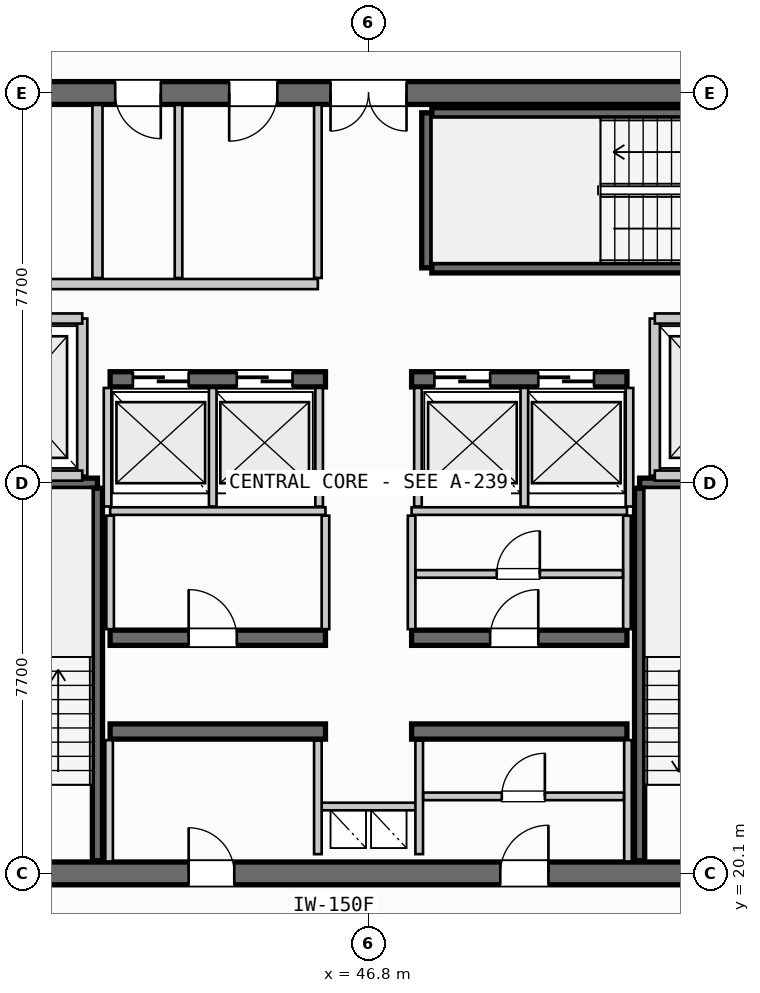
"""IFC4 building model, lengths in metres.
Left out: names, types, materials, properties, quantities, classifications, styles, units other than length and angle.
Written with IfcOpenShell. Run it as: python <this file> out.ifc"""

import sys

from ifc_helpers import new_model, si_unit, direction, frame, frame_2d, origin, place, context, subcontext, project, spatial, rectangle, extrude, source, transform, mapped, element, fill, save


model = new_model("IFC4")
c1 = context("Model", 3, precision=1e-05, world=origin(), true_north=direction((0.0, 1.0)))
c2 = subcontext(c1, "Body", "Model", "MODEL_VIEW")
j1 = project(units=[si_unit("LENGTHUNIT", "METRE"), si_unit("PLANEANGLEUNIT", "RADIAN")], contexts=[c1])
p1 = place(None, origin())
s1 = spatial("IfcSite", under=j1, at=p1, CompositionType="ELEMENT")
p2 = place(p1, origin())
s2 = spatial("IfcBuilding", under=s1, at=p2, CompositionType="ELEMENT")
p3 = place(p2, frame((0.0, 0.0, 280.15)))
s3 = spatial("IfcBuildingStorey", under=s2, at=p3, CompositionType="ELEMENT", Elevation=280.15)
p4 = place(p3, frame((38.0, 20.1, 0.0), z_axis=(0.0, 0.0, 1.0), x_axis=(1.0, 0.0, 0.0)))
e1 = element("IfcWall", 1, at=p4, inside=s3, PredefinedType="SHEAR", context=c2, shape_type="SweptSolid", body=[
    extrude(rectangle(XDim=17.6, YDim=0.45, at=frame_2d((8.8, 0.0))), origin(), (0.0, 0.0, 1.0), 3.21),
])
p5 = place(p4, frame((1.4, 0.0, 0.0)))
e2 = element("IfcOpeningElement", 2, at=p5, cuts=e1, PredefinedType="OPENING", context=c2, shape_type="SweptSolid", body=[
    extrude(rectangle(XDim=1.05, YDim=2.15, at=frame_2d((0.525, 1.075))), frame((0.0, 0.235, 0.0), z_axis=(0.0, -1.0, 0.0), x_axis=(1.0, 0.0, 0.0)), (0.0, 0.0, 1.0), 0.47),
])
p6 = place(p4, frame((15.15, 0.0, 0.0)))
e3 = element("IfcOpeningElement", 3, at=p6, cuts=e1, PredefinedType="OPENING", context=c2, shape_type="SweptSolid", body=[
    extrude(rectangle(XDim=1.05, YDim=2.15, at=frame_2d((0.525, 1.075))), frame((0.0, 0.235, 0.0), z_axis=(0.0, -1.0, 0.0), x_axis=(1.0, 0.0, 0.0)), (0.0, 0.0, 1.0), 0.47),
])
p7 = place(p4, frame((5.25, 0.0, 0.0)))
e4 = element("IfcOpeningElement", 4, at=p7, cuts=e1, PredefinedType="OPENING", context=c2, shape_type="SweptSolid", body=[
    extrude(rectangle(XDim=0.9, YDim=2.15, at=frame_2d((0.45, 1.075))), frame((0.0, 0.235, 0.0), z_axis=(0.0, -1.0, 0.0), x_axis=(1.0, 0.0, 0.0)), (0.0, 0.0, 1.0), 0.47),
])
p8 = place(p4, frame((11.4, 0.0, 0.0)))
e5 = element("IfcOpeningElement", 5, at=p8, cuts=e1, PredefinedType="OPENING", context=c2, shape_type="SweptSolid", body=[
    extrude(rectangle(XDim=0.95, YDim=2.15, at=frame_2d((0.475, 1.075))), frame((0.0, 0.235, 0.0), z_axis=(0.0, -1.0, 0.0), x_axis=(1.0, 0.0, 0.0)), (0.0, 0.0, 1.0), 0.47),
])
p9 = place(p3, frame((55.6, 35.5, 0.0), z_axis=(0.0, 0.0, 1.0), x_axis=(-1.0, 0.0, 0.0)))
e6 = element("IfcWall", 6, at=p9, inside=s3, PredefinedType="SHEAR", context=c2, shape_type="SweptSolid", body=[
    extrude(rectangle(XDim=17.6, YDim=0.45, at=frame_2d((8.8, 0.0))), origin(), (0.0, 0.0, 1.0), 3.21),
])
p10 = place(p9, frame((8.05, 0.0, 0.0)))
e7 = element("IfcOpeningElement", 7, at=p10, cuts=e6, PredefinedType="OPENING", context=c2, shape_type="SweptSolid", body=[
    extrude(rectangle(XDim=1.5, YDim=2.2, at=frame_2d((0.75, 1.1))), frame((0.0, 0.235, 0.0), z_axis=(0.0, -1.0, 0.0), x_axis=(1.0, 0.0, 0.0)), (0.0, 0.0, 1.0), 0.47),
])
p11 = place(p9, frame((15.1, 0.0, 0.0)))
e8 = element("IfcOpeningElement", 8, at=p11, cuts=e6, PredefinedType="OPENING", context=c2, shape_type="SweptSolid", body=[
    extrude(rectangle(XDim=0.95, YDim=2.15, at=frame_2d((0.475, 1.075))), frame((0.0, 0.235, 0.0), z_axis=(0.0, -1.0, 0.0), x_axis=(1.0, 0.0, 0.0)), (0.0, 0.0, 1.0), 0.47),
])
p12 = place(p9, frame((12.9, 0.0, 0.0)))
e9 = element("IfcOpeningElement", 9, at=p12, cuts=e6, PredefinedType="OPENING", context=c2, shape_type="SweptSolid", body=[
    extrude(rectangle(XDim=0.9, YDim=2.15, at=frame_2d((0.45, 1.075))), frame((0.0, 0.235, 0.0), z_axis=(0.0, -1.0, 0.0), x_axis=(1.0, 0.0, 0.0)), (0.0, 0.0, 1.0), 0.47),
])
p13 = place(p9, frame((10.6, 0.0, 0.0)))
e10 = element("IfcOpeningElement", 10, at=p13, cuts=e6, PredefinedType="OPENING", context=c2, shape_type="SweptSolid", body=[
    extrude(rectangle(XDim=0.95, YDim=2.15, at=frame_2d((0.475, 1.075))), frame((0.0, 0.235, 0.0), z_axis=(0.0, -1.0, 0.0), x_axis=(1.0, 0.0, 0.0)), (0.0, 0.0, 1.0), 0.47),
])
for number, where, z_axis, x_axis in (
    (11, (41.7, 22.9, 0.0), (0.0, 0.0, 1.0), (1.0, 0.0, 0.0)),
    (12, (47.65, 22.9, 0.0), (0.0, 0.0, 1.0), (1.0, 0.0, 0.0)),
):
    element("IfcWall", number, at=place(p3, frame(where, z_axis=z_axis, x_axis=x_axis)), inside=s3, PredefinedType="SHEAR", context=c2, shape_type="SweptSolid", body=[
        extrude(rectangle(XDim=4.25, YDim=0.3, at=frame_2d((2.125, 0.0))), origin(), (0.0, 0.0, 1.0), 3.21),
    ])
p14 = place(p3, frame((41.7, 24.75, 0.0), z_axis=(0.0, 0.0, 1.0), x_axis=(1.0, 0.0, 0.0)))
e13 = element("IfcWall", 13, at=p14, inside=s3, PredefinedType="SHEAR", context=c2, shape_type="SweptSolid", body=[
    extrude(rectangle(XDim=4.25, YDim=0.3, at=frame_2d((2.125, 0.0))), origin(), (0.0, 0.0, 1.0), 3.21),
])
p15 = place(p14, frame((1.55, 0.0, 0.0)))
e14 = element("IfcOpeningElement", 14, at=p15, cuts=e13, PredefinedType="OPENING", context=c2, shape_type="SweptSolid", body=[
    extrude(rectangle(XDim=0.95, YDim=2.15, at=frame_2d((0.475, 1.075))), frame((0.0, 0.16, 0.0), z_axis=(0.0, -1.0, 0.0), x_axis=(1.0, 0.0, 0.0)), (0.0, 0.0, 1.0), 0.32),
])
p16 = place(p3, frame((47.65, 24.75, 0.0), z_axis=(0.0, 0.0, 1.0), x_axis=(1.0, 0.0, 0.0)))
e15 = element("IfcWall", 15, at=p16, inside=s3, PredefinedType="SHEAR", context=c2, shape_type="SweptSolid", body=[
    extrude(rectangle(XDim=4.25, YDim=0.3, at=frame_2d((2.125, 0.0))), origin(), (0.0, 0.0, 1.0), 3.21),
])
p17 = place(p16, frame((1.55, 0.0, 0.0)))
e16 = element("IfcOpeningElement", 16, at=p17, cuts=e15, PredefinedType="OPENING", context=c2, shape_type="SweptSolid", body=[
    extrude(rectangle(XDim=0.95, YDim=2.15, at=frame_2d((0.475, 1.075))), frame((0.0, 0.16, 0.0), z_axis=(0.0, -1.0, 0.0), x_axis=(1.0, 0.0, 0.0)), (0.0, 0.0, 1.0), 0.32),
])
p18 = place(p3, frame((41.7, 29.85, 0.0), z_axis=(0.0, 0.0, 1.0), x_axis=(1.0, 0.0, 0.0)))
e17 = element("IfcWall", 17, at=p18, inside=s3, PredefinedType="SHEAR", context=c2, shape_type="SweptSolid", body=[
    extrude(rectangle(XDim=4.25, YDim=0.3, at=frame_2d((2.125, 0.0))), origin(), (0.0, 0.0, 1.0), 3.21),
])
p19 = place(p18, frame((0.45, 0.0, 0.0)))
e18 = element("IfcOpeningElement", 18, at=p19, cuts=e17, PredefinedType="OPENING", context=c2, shape_type="SweptSolid", body=[
    extrude(rectangle(XDim=1.1, YDim=2.2, at=frame_2d((0.55, 1.1))), frame((0.0, 0.16, 0.0), z_axis=(0.0, -1.0, 0.0), x_axis=(1.0, 0.0, 0.0)), (0.0, 0.0, 1.0), 0.32),
])
p20 = place(p18, frame((2.5, 0.0, 0.0)))
e19 = element("IfcOpeningElement", 19, at=p20, cuts=e17, PredefinedType="OPENING", context=c2, shape_type="SweptSolid", body=[
    extrude(rectangle(XDim=1.1, YDim=2.2, at=frame_2d((0.55, 1.1))), frame((0.0, 0.16, 0.0), z_axis=(0.0, -1.0, 0.0), x_axis=(1.0, 0.0, 0.0)), (0.0, 0.0, 1.0), 0.32),
])
p21 = place(p3, frame((47.65, 29.85, 0.0), z_axis=(0.0, 0.0, 1.0), x_axis=(1.0, 0.0, 0.0)))
e20 = element("IfcWall", 20, at=p21, inside=s3, PredefinedType="SHEAR", context=c2, shape_type="SweptSolid", body=[
    extrude(rectangle(XDim=4.25, YDim=0.3, at=frame_2d((2.125, 0.0))), origin(), (0.0, 0.0, 1.0), 3.21),
])
p22 = place(p21, frame((0.45, 0.0, 0.0)))
e21 = element("IfcOpeningElement", 21, at=p22, cuts=e20, PredefinedType="OPENING", context=c2, shape_type="SweptSolid", body=[
    extrude(rectangle(XDim=1.1, YDim=2.2, at=frame_2d((0.55, 1.1))), frame((0.0, 0.16, 0.0), z_axis=(0.0, -1.0, 0.0), x_axis=(1.0, 0.0, 0.0)), (0.0, 0.0, 1.0), 0.32),
])
p23 = place(p21, frame((2.5, 0.0, 0.0)))
e22 = element("IfcOpeningElement", 22, at=p23, cuts=e20, PredefinedType="OPENING", context=c2, shape_type="SweptSolid", body=[
    extrude(rectangle(XDim=1.1, YDim=2.2, at=frame_2d((0.55, 1.1))), frame((0.0, 0.16, 0.0), z_axis=(0.0, -1.0, 0.0), x_axis=(1.0, 0.0, 0.0)), (0.0, 0.0, 1.0), 0.32),
])
p24 = place(p3, frame((38.39, 27.8, 0.0), z_axis=(0.0, 0.0, 1.0), x_axis=(1.0, 0.0, 0.0)))
e23 = element("IfcWall", 23, at=p24, inside=s3, PredefinedType="SHEAR", context=c2, shape_type="SweptSolid", body=[
    extrude(rectangle(XDim=3.06, YDim=0.2, at=frame_2d((1.53, 0.0))), origin(), (0.0, 0.0, 1.0), 3.21),
])
p25 = place(p3, frame((41.45, 27.7, 0.0), z_axis=(0.0, 0.0, 1.0), x_axis=(0.0, -1.0, 0.0)))
e24 = element("IfcWall", 24, at=p25, inside=s3, PredefinedType="SHEAR", context=c2, shape_type="SweptSolid", body=[
    extrude(rectangle(XDim=7.35, YDim=0.2, at=frame_2d((3.675, 0.0))), origin(), (0.0, 0.0, 1.0), 3.21),
])
p26 = place(p3, frame((52.15, 27.8, 0.0), z_axis=(0.0, 0.0, 1.0), x_axis=(1.0, 0.0, 0.0)))
e25 = element("IfcWall", 25, at=p26, inside=s3, PredefinedType="SHEAR", context=c2, shape_type="SweptSolid", body=[
    extrude(rectangle(XDim=3.06, YDim=0.2, at=frame_2d((1.53, 0.0))), origin(), (0.0, 0.0, 1.0), 3.21),
])
p27 = place(p3, frame((52.15, 20.35, 0.0), z_axis=(0.0, 0.0, 1.0), x_axis=(0.0, 1.0, 0.0)))
e26 = element("IfcWall", 26, at=p27, inside=s3, PredefinedType="SHEAR", context=c2, shape_type="SweptSolid", body=[
    extrude(rectangle(XDim=7.35, YDim=0.2, at=frame_2d((3.675, 0.0))), origin(), (0.0, 0.0, 1.0), 3.21),
])
p28 = place(p3, frame((47.95, 32.05, 0.0), z_axis=(0.0, 0.0, 1.0), x_axis=(0.0, 1.0, 0.0)))
e27 = element("IfcWall", 27, at=p28, inside=s3, PredefinedType="SHEAR", context=c2, shape_type="SweptSolid", body=[
    extrude(rectangle(XDim=3.06, YDim=0.2, at=frame_2d((1.53, 0.0))), origin(), (0.0, 0.0, 1.0), 3.21),
])
for number, where, z_axis, x_axis in (
    (28, (48.05, 35.11, 0.0), (0.0, 0.0, 1.0), (1.0, 0.0, 0.0)),
    (29, (55.4, 32.05, 0.0), (0.0, 0.0, 1.0), (-1.0, 0.0, 0.0)),
):
    element("IfcWall", number, at=place(p3, frame(where, z_axis=z_axis, x_axis=x_axis)), inside=s3, PredefinedType="SHEAR", context=c2, shape_type="SweptSolid", body=[
        extrude(rectangle(XDim=7.35, YDim=0.2, at=frame_2d((3.675, 0.0))), origin(), (0.0, 0.0, 1.0), 3.21),
    ])
p29 = place(p3, frame((45.8, 21.42, 0.0), z_axis=(0.0, 0.0, 1.0), x_axis=(1.0, 0.0, 0.0)))
e30 = element("IfcWall", 30, at=p29, inside=s3, PredefinedType="PARTITIONING", context=c2, shape_type="SweptSolid", body=[
    extrude(rectangle(XDim=2.0, YDim=0.15, at=frame_2d((1.0, 0.0))), origin(), (0.0, 0.0, 1.0), 2.455),
])
for number, where, z_axis, x_axis in (
    (31, (45.8, 20.48, 0.0), (0.0, 0.0, 1.0), (0.0, 1.0, 0.0)),
    (32, (47.8, 20.48, 0.0), (0.0, 0.0, 1.0), (0.0, 1.0, 0.0)),
):
    element("IfcWall", number, at=place(p3, frame(where, z_axis=z_axis, x_axis=x_axis)), inside=s3, PredefinedType="PARTITIONING", context=c2, shape_type="SweptSolid", body=[
        extrude(rectangle(XDim=2.24, YDim=0.15, at=frame_2d((1.12, 0.0))), origin(), (0.0, 0.0, 1.0), 2.455),
    ])
p30 = place(p3, frame((41.15, 27.95, 0.0), z_axis=(0.0, 0.0, 1.0), x_axis=(0.0, 1.0, 0.0)))
e33 = element("IfcWall", 33, at=p30, inside=s3, PredefinedType="PARTITIONING", context=c2, shape_type="SweptSolid", body=[
    extrude(rectangle(XDim=3.1, YDim=0.2, at=frame_2d((1.55, 0.0))), origin(), (0.0, 0.0, 1.0), 2.455),
])
for number, where, z_axis, x_axis in (
    (34, (38.235, 27.95, 0.0), (0.0, 0.0, 1.0), (1.0, 0.0, 0.0)),
    (35, (38.235, 31.05, 0.0), (0.0, 0.0, 1.0), (1.0, 0.0, 0.0)),
):
    element("IfcWall", number, at=place(p3, frame(where, z_axis=z_axis, x_axis=x_axis)), inside=s3, PredefinedType="PARTITIONING", context=c2, shape_type="SweptSolid", body=[
        extrude(rectangle(XDim=2.915, YDim=0.2, at=frame_2d((1.458, 0.0))), origin(), (0.0, 0.0, 1.0), 2.455),
    ])
p31 = place(p3, frame((52.45, 27.95, 0.0), z_axis=(0.0, 0.0, 1.0), x_axis=(0.0, 1.0, 0.0)))
e36 = element("IfcWall", 36, at=p31, inside=s3, PredefinedType="PARTITIONING", context=c2, shape_type="SweptSolid", body=[
    extrude(rectangle(XDim=3.1, YDim=0.2, at=frame_2d((1.55, 0.0))), origin(), (0.0, 0.0, 1.0), 2.455),
])
for number, where, z_axis, x_axis in (
    (37, (52.45, 27.95, 0.0), (0.0, 0.0, 1.0), (1.0, 0.0, 0.0)),
    (38, (52.45, 31.05, 0.0), (0.0, 0.0, 1.0), (1.0, 0.0, 0.0)),
):
    element("IfcWall", number, at=place(p3, frame(where, z_axis=z_axis, x_axis=x_axis)), inside=s3, PredefinedType="PARTITIONING", context=c2, shape_type="SweptSolid", body=[
        extrude(rectangle(XDim=2.915, YDim=0.2, at=frame_2d((1.458, 0.0))), origin(), (0.0, 0.0, 1.0), 2.455),
    ])
for number, where, z_axis, x_axis in (
    (39, (41.68, 20.335, 0.0), (0.0, 0.0, 1.0), (0.0, 1.0, 0.0)),
    (40, (51.92, 20.335, 0.0), (0.0, 0.0, 1.0), (0.0, 1.0, 0.0)),
):
    element("IfcWall", number, at=place(p3, frame(where, z_axis=z_axis, x_axis=x_axis)), inside=s3, PredefinedType="PARTITIONING", context=c2, shape_type="SweptSolid", body=[
        extrude(rectangle(XDim=2.395, YDim=0.15, at=frame_2d((1.198, 0.0))), origin(), (0.0, 0.0, 1.0), 2.455),
    ])
p32 = place(p3, frame((47.88, 21.62, 0.0), z_axis=(0.0, 0.0, 1.0), x_axis=(1.0, 0.0, 0.0)))
e41 = element("IfcWall", 41, at=p32, inside=s3, PredefinedType="PARTITIONING", context=c2, shape_type="SweptSolid", body=[
    extrude(rectangle(XDim=3.96, YDim=0.15, at=frame_2d((1.98, 0.0))), origin(), (0.0, 0.0, 1.0), 2.455),
])
p33 = place(p32, frame((1.55, 0.0, 0.0)))
e42 = element("IfcOpeningElement", 42, at=p33, cuts=e41, PredefinedType="OPENING", context=c2, shape_type="SweptSolid", body=[
    extrude(rectangle(XDim=0.85, YDim=2.15, at=frame_2d((0.425, 1.075))), frame((0.0, 0.085, 0.0), z_axis=(0.0, -1.0, 0.0), x_axis=(1.0, 0.0, 0.0)), (0.0, 0.0, 1.0), 0.17),
])
for number, where, z_axis, x_axis in (
    (43, (41.7, 27.25, 0.0), (0.0, 0.0, 1.0), (1.0, 0.0, 0.0)),
    (44, (47.65, 27.25, 0.0), (0.0, 0.0, 1.0), (1.0, 0.0, 0.0)),
):
    element("IfcWall", number, at=place(p3, frame(where, z_axis=z_axis, x_axis=x_axis)), inside=s3, PredefinedType="PARTITIONING", context=c2, shape_type="SweptSolid", body=[
        extrude(rectangle(XDim=4.25, YDim=0.15, at=frame_2d((2.125, 0.0))), origin(), (0.0, 0.0, 1.0), 2.455),
    ])
for number, where, z_axis, x_axis in (
    (45, (41.7, 24.92, 0.0), (0.0, 0.0, 1.0), (0.0, 1.0, 0.0)),
    (46, (45.95, 24.92, 0.0), (0.0, 0.0, 1.0), (0.0, 1.0, 0.0)),
    (47, (47.65, 24.92, 0.0), (0.0, 0.0, 1.0), (0.0, 1.0, 0.0)),
    (48, (51.9, 24.92, 0.0), (0.0, 0.0, 1.0), (0.0, 1.0, 0.0)),
):
    element("IfcWall", number, at=place(p3, frame(where, z_axis=z_axis, x_axis=x_axis)), inside=s3, PredefinedType="PARTITIONING", context=c2, shape_type="SweptSolid", body=[
        extrude(rectangle(XDim=2.24, YDim=0.15, at=frame_2d((1.12, 0.0))), origin(), (0.0, 0.0, 1.0), 2.455),
    ])
p34 = place(p3, frame((47.73, 26.01, 0.0), z_axis=(0.0, 0.0, 1.0), x_axis=(1.0, 0.0, 0.0)))
e49 = element("IfcWall", 49, at=p34, inside=s3, PredefinedType="PARTITIONING", context=c2, shape_type="SweptSolid", body=[
    extrude(rectangle(XDim=4.09, YDim=0.15, at=frame_2d((2.045, 0.0))), origin(), (0.0, 0.0, 1.0), 2.455),
])
p35 = place(p34, frame((1.6, 0.0, 0.0)))
e50 = element("IfcOpeningElement", 50, at=p35, cuts=e49, PredefinedType="OPENING", context=c2, shape_type="SweptSolid", body=[
    extrude(rectangle(XDim=0.85, YDim=2.15, at=frame_2d((0.425, 1.075))), frame((0.0, 0.085, 0.0), z_axis=(0.0, -1.0, 0.0), x_axis=(1.0, 0.0, 0.0)), (0.0, 0.0, 1.0), 0.17),
])
for number, where, z_axis, x_axis in (
    (51, (41.65, 27.34, 0.0), (0.0, 0.0, 1.0), (0.0, 1.0, 0.0)),
    (52, (43.725, 27.34, 0.0), (0.0, 0.0, 1.0), (0.0, 1.0, 0.0)),
    (53, (45.825, 27.34, 0.0), (0.0, 0.0, 1.0), (0.0, 1.0, 0.0)),
    (54, (47.775, 27.34, 0.0), (0.0, 0.0, 1.0), (0.0, 1.0, 0.0)),
    (55, (49.875, 27.34, 0.0), (0.0, 0.0, 1.0), (0.0, 1.0, 0.0)),
    (56, (51.95, 27.34, 0.0), (0.0, 0.0, 1.0), (0.0, 1.0, 0.0)),
):
    element("IfcWall", number, at=place(p3, frame(where, z_axis=z_axis, x_axis=x_axis)), inside=s3, PredefinedType="PARTITIONING", context=c2, shape_type="SweptSolid", body=[
        extrude(rectangle(XDim=2.34, YDim=0.15, at=frame_2d((1.17, 0.0))), origin(), (0.0, 0.0, 1.0), 2.455),
    ])
p36 = place(p3, frame((41.45, 31.85, 0.0), z_axis=(0.0, 0.0, 1.0), x_axis=(0.0, 1.0, 0.0)))
e57 = element("IfcWall", 57, at=p36, inside=s3, PredefinedType="PARTITIONING", context=c2, shape_type="SweptSolid", body=[
    extrude(rectangle(XDim=3.415, YDim=0.2, at=frame_2d((1.708, 0.0))), origin(), (0.0, 0.0, 1.0), 2.455),
])
p37 = place(p3, frame((38.235, 31.73, 0.0), z_axis=(0.0, 0.0, 1.0), x_axis=(1.0, 0.0, 0.0)))
e58 = element("IfcWall", 58, at=p37, inside=s3, PredefinedType="PARTITIONING", context=c2, shape_type="SweptSolid", body=[
    extrude(rectangle(XDim=7.565, YDim=0.2, at=frame_2d((3.782, 0.0))), origin(), (0.0, 0.0, 1.0), 2.455),
])
p38 = place(p3, frame((45.8, 31.85, 0.0), z_axis=(0.0, 0.0, 1.0), x_axis=(0.0, 1.0, 0.0)))
e59 = element("IfcWall", 59, at=p38, inside=s3, PredefinedType="PARTITIONING", context=c2, shape_type="SweptSolid", body=[
    extrude(rectangle(XDim=3.415, YDim=0.15, at=frame_2d((1.708, 0.0))), origin(), (0.0, 0.0, 1.0), 2.455),
])
p39 = place(p3, frame((43.05, 31.85, 0.0), z_axis=(0.0, 0.0, 1.0), x_axis=(0.0, 1.0, 0.0)))
e60 = element("IfcWall", 60, at=p39, inside=s3, PredefinedType="PLUMBINGWALL", context=c2, shape_type="SweptSolid", body=[
    extrude(rectangle(XDim=3.415, YDim=0.15, at=frame_2d((1.708, 0.0))), origin(), (0.0, 0.0, 1.0), 2.455),
])
m1 = source(origin(), c2, "Body", "SweptSolid", [
    extrude(rectangle(XDim=1.5, YDim=2.2, at=frame_2d((0.75, 1.1))), frame((0.0, 0.025, 0.0), z_axis=(0.0, -1.0, 0.0), x_axis=(1.0, 0.0, 0.0)), (0.0, 0.0, 1.0), 0.05),
])
p40 = place(p10, origin())
e61 = element("IfcDoor", 61, at=p40, inside=s3, OperationType="DOUBLE_DOOR_SINGLE_SWING", PredefinedType="DOOR", context=c2, shape_type="MappedRepresentation", body=[
    mapped(m1, transform((0.0, 0.0, 0.0), scale=1.0)),
])
fill(e7, e61)
m2 = source(origin(), c2, "Body", "SweptSolid", [
    extrude(rectangle(XDim=0.9, YDim=2.15, at=frame_2d((0.45, 1.075))), frame((0.0, 0.025, 0.0), z_axis=(0.0, -1.0, 0.0), x_axis=(1.0, 0.0, 0.0)), (0.0, 0.0, 1.0), 0.05),
])
p41 = place(p7, origin())
e62 = element("IfcDoor", 62, at=p41, inside=s3, OperationType="SINGLE_SWING_LEFT", PredefinedType="DOOR", context=c2, shape_type="MappedRepresentation", body=[
    mapped(m2, transform((0.0, 0.0, 0.0), scale=1.0)),
])
fill(e4, e62)
m3 = source(origin(), c2, "Body", "SweptSolid", [
    extrude(rectangle(XDim=0.95, YDim=2.15, at=frame_2d((0.475, 1.075))), frame((0.0, 0.025, 0.0), z_axis=(0.0, -1.0, 0.0), x_axis=(1.0, 0.0, 0.0)), (0.0, 0.0, 1.0), 0.05),
])
p42 = place(p8, origin())
e63 = element("IfcDoor", 63, at=p42, inside=s3, OperationType="SINGLE_SWING_RIGHT", PredefinedType="DOOR", context=c2, shape_type="MappedRepresentation", body=[
    mapped(m3, transform((0.0, 0.0, 0.0), scale=1.0)),
])
fill(e5, e63)
p43 = place(p15, origin())
e64 = element("IfcDoor", 64, at=p43, inside=s3, OperationType="SINGLE_SWING_LEFT", PredefinedType="DOOR", context=c2, shape_type="MappedRepresentation", body=[
    mapped(m3, transform((0.0, 0.0, 0.0), scale=1.0)),
])
fill(e14, e64)
p44 = place(p17, origin())
e65 = element("IfcDoor", 65, at=p44, inside=s3, OperationType="SINGLE_SWING_RIGHT", PredefinedType="DOOR", context=c2, shape_type="MappedRepresentation", body=[
    mapped(m3, transform((0.0, 0.0, 0.0), scale=1.0)),
])
fill(e16, e65)
m4 = source(origin(), c2, "Body", "SweptSolid", [
    extrude(rectangle(XDim=1.1, YDim=2.2, at=frame_2d((0.55, 1.1))), frame((0.0, 0.025, 0.0), z_axis=(0.0, -1.0, 0.0), x_axis=(1.0, 0.0, 0.0)), (0.0, 0.0, 1.0), 0.05),
])
p45 = place(p19, origin())
e66 = element("IfcDoor", 66, at=p45, inside=s3, OperationType="SLIDING_TO_LEFT", PredefinedType="DOOR", context=c2, shape_type="MappedRepresentation", body=[
    mapped(m4, transform((0.0, 0.0, 0.0), scale=1.0)),
])
fill(e18, e66)
p46 = place(p20, origin())
e67 = element("IfcDoor", 67, at=p46, inside=s3, OperationType="SLIDING_TO_LEFT", PredefinedType="DOOR", context=c2, shape_type="MappedRepresentation", body=[
    mapped(m4, transform((0.0, 0.0, 0.0), scale=1.0)),
])
fill(e19, e67)
p47 = place(p22, origin())
e68 = element("IfcDoor", 68, at=p47, inside=s3, OperationType="SLIDING_TO_LEFT", PredefinedType="DOOR", context=c2, shape_type="MappedRepresentation", body=[
    mapped(m4, transform((0.0, 0.0, 0.0), scale=1.0)),
])
fill(e21, e68)
p48 = place(p23, origin())
e69 = element("IfcDoor", 69, at=p48, inside=s3, OperationType="SLIDING_TO_LEFT", PredefinedType="DOOR", context=c2, shape_type="MappedRepresentation", body=[
    mapped(m4, transform((0.0, 0.0, 0.0), scale=1.0)),
])
fill(e22, e69)
p49 = place(p12, origin())
e70 = element("IfcDoor", 70, at=p49, inside=s3, OperationType="SINGLE_SWING_LEFT", PredefinedType="DOOR", context=c2, shape_type="MappedRepresentation", body=[
    mapped(m2, transform((0.0, 0.0, 0.0), scale=1.0)),
])
fill(e9, e70)
p50 = place(p13, origin())
e71 = element("IfcDoor", 71, at=p50, inside=s3, OperationType="SINGLE_SWING_RIGHT", PredefinedType="DOOR", context=c2, shape_type="MappedRepresentation", body=[
    mapped(m3, transform((0.0, 0.0, 0.0), scale=1.0)),
])
fill(e10, e71)
m5 = source(origin(), c2, "Body", "SweptSolid", [
    extrude(rectangle(XDim=0.85, YDim=2.15, at=frame_2d((0.425, 1.075))), frame((0.0, 0.025, 0.0), z_axis=(0.0, -1.0, 0.0), x_axis=(1.0, 0.0, 0.0)), (0.0, 0.0, 1.0), 0.05),
])
p51 = place(p33, origin())
e72 = element("IfcDoor", 72, at=p51, inside=s3, OperationType="SINGLE_SWING_RIGHT", PredefinedType="DOOR", context=c2, shape_type="MappedRepresentation", body=[
    mapped(m5, transform((0.0, 0.0, 0.0), scale=1.0)),
])
fill(e42, e72)
p52 = place(p35, origin())
e73 = element("IfcDoor", 73, at=p52, inside=s3, OperationType="SINGLE_SWING_RIGHT", PredefinedType="DOOR", context=c2, shape_type="MappedRepresentation", body=[
    mapped(m5, transform((0.0, 0.0, 0.0), scale=1.0)),
])
fill(e50, e73)
save(model, sys.argv[1])
